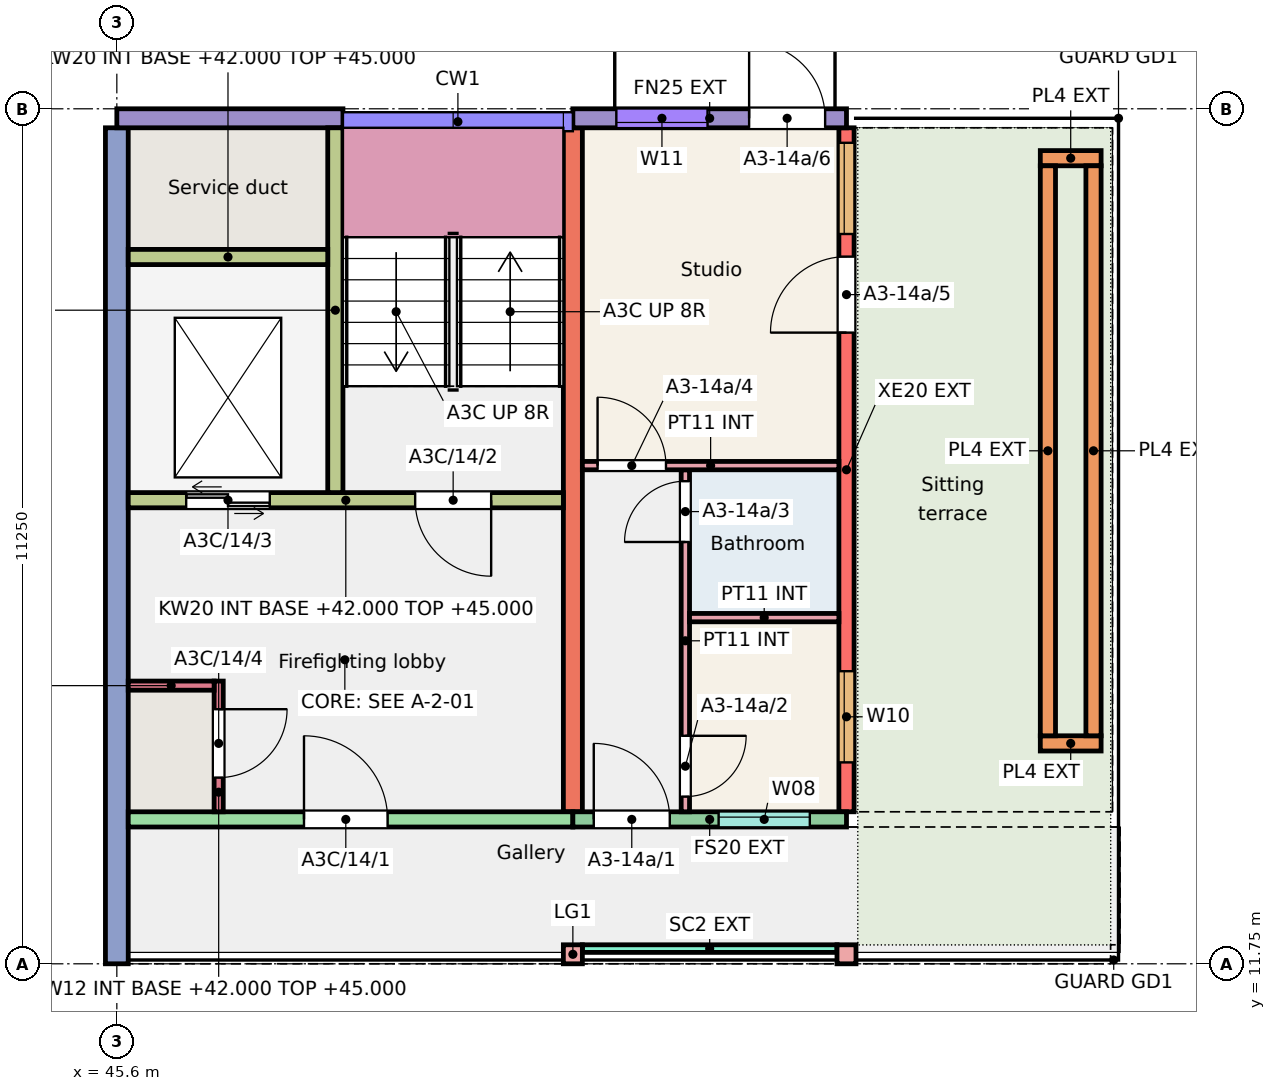
"""IFC4 building model, lengths in metres.
Left out: names, types, materials, properties, quantities, classifications, styles, units other than length and angle.
Written with IfcOpenShell. Run it as: python <this file> out.ifc"""

import sys

from ifc_helpers import new_model, si_unit, direction, frame, frame_2d, origin, origin_2d, place, context, subcontext, project, spatial, rectangle, extrude, element, fill, save


model = new_model("IFC4")
c1 = context("Model", 3, precision=1e-05, world=origin(), true_north=direction((0.0, 1.0)))
c2 = subcontext(c1, "Body", "Model", "MODEL_VIEW")
j1 = project(units=[si_unit("LENGTHUNIT", "METRE"), si_unit("PLANEANGLEUNIT", "RADIAN")], contexts=[c1])
p1 = place(None, origin())
s1 = spatial("IfcSite", under=j1, at=p1, CompositionType="ELEMENT")
p2 = place(p1, origin())
s2 = spatial("IfcBuilding", under=s1, at=p2, CompositionType="ELEMENT")
p3 = place(p2, frame((0.0, 0.0, 42.0)))
s3 = spatial("IfcBuildingStorey", under=s2, at=p3, CompositionType="ELEMENT", Elevation=42.0)
p4 = place(p3, frame((45.6, 11.75, 0.0), z_axis=(0.0, 0.0, 1.0), x_axis=(0.0, 1.0, 0.0)))
e1 = element("IfcWall", 1, at=p4, inside=s3, PredefinedType="SHEAR", context=c2, shape_type="SweptSolid", body=[
    extrude(rectangle(XDim=11.0, YDim=0.3, at=frame_2d((5.5, 0.0))), origin(), (0.0, 0.0, 1.0), 3.0),
])
p5 = place(p3, frame((51.6, 13.75, 0.0), z_axis=(0.0, 0.0, 1.0), x_axis=(0.0, 1.0, 0.0)))
e2 = element("IfcWall", 2, at=p5, inside=s3, PredefinedType="SHEAR", context=c2, shape_type="SweptSolid", body=[
    extrude(rectangle(XDim=9.0, YDim=0.25, at=frame_2d((4.5, 0.0))), origin(), (0.0, 0.0, 1.0), 3.0),
])
p6 = place(p3, frame((55.2, 13.75, 0.0), z_axis=(0.0, 0.0, 1.0), x_axis=(0.0, 1.0, 0.0)))
e3 = element("IfcWall", 3, at=p6, inside=s3, PredefinedType="SHEAR", context=c2, shape_type="SweptSolid", body=[
    extrude(rectangle(XDim=9.0, YDim=0.2, at=frame_2d((4.5, 0.0))), origin(), (0.0, 0.0, 1.0), 3.0),
])
p7 = place(p6, frame((0.65, 0.0, 0.9)))
e4 = element("IfcOpeningElement", 4, at=p7, cuts=e3, PredefinedType="OPENING", context=c2, shape_type="SweptSolid", body=[
    extrude(rectangle(XDim=1.2, YDim=1.5, at=frame_2d((0.6, 0.75))), frame((0.0, 0.11, 0.0), z_axis=(0.0, -1.0, 0.0), x_axis=(1.0, 0.0, 0.0)), (0.0, 0.0, 1.0), 0.22),
])
p8 = place(p6, frame((7.603, 0.0, 0.9)))
e5 = element("IfcOpeningElement", 5, at=p8, cuts=e3, PredefinedType="OPENING", context=c2, shape_type="SweptSolid", body=[
    extrude(rectangle(XDim=1.2, YDim=1.5, at=frame_2d((0.6, 0.75))), frame((0.0, 0.11, 0.0), z_axis=(0.0, -1.0, 0.0), x_axis=(1.0, 0.0, 0.0)), (0.0, 0.0, 1.0), 0.22),
])
p9 = place(p6, frame((6.305, 0.0, 0.0)))
e6 = element("IfcOpeningElement", 6, at=p9, cuts=e3, PredefinedType="OPENING", context=c2, shape_type="SweptSolid", body=[
    extrude(rectangle(XDim=1.0, YDim=2.1, at=frame_2d((0.5, 1.05))), frame((0.0, 0.11, 0.0), z_axis=(0.0, -1.0, 0.0), x_axis=(1.0, 0.0, 0.0)), (0.0, 0.0, 1.0), 0.22),
])
p10 = place(p3, frame((45.6, 22.875, 0.0), z_axis=(0.0, 0.0, 1.0), x_axis=(1.0, 0.0, 0.0)))
e7 = element("IfcWall", 7, at=p10, inside=s3, PredefinedType="SOLIDWALL", context=c2, shape_type="SweptSolid", body=[
    extrude(rectangle(XDim=2.975, YDim=0.25, at=frame_2d((1.487, 0.0))), origin(), (0.0, 0.0, 1.0), 3.0),
])
p11 = place(p3, frame((45.75, 13.65, 0.0), z_axis=(0.0, 0.0, 1.0), x_axis=(1.0, 0.0, 0.0)))
e8 = element("IfcWall", 8, at=p11, inside=s3, PredefinedType="SHEAR", context=c2, shape_type="SweptSolid", body=[
    extrude(rectangle(XDim=5.85, YDim=0.2, at=frame_2d((2.925, 0.0))), origin(), (0.0, 0.0, 1.0), 3.0),
])
p12 = place(p11, frame((2.312, 0.0, 0.0)))
e9 = element("IfcOpeningElement", 9, at=p12, cuts=e8, PredefinedType="OPENING", context=c2, shape_type="SweptSolid", body=[
    extrude(rectangle(XDim=1.1, YDim=2.1, at=frame_2d((0.55, 1.05))), frame((0.0, 0.11, 0.0), z_axis=(0.0, -1.0, 0.0), x_axis=(1.0, 0.0, 0.0)), (0.0, 0.0, 1.0), 0.22),
])
p13 = place(p3, frame((45.75, 17.85, 0.0), z_axis=(0.0, 0.0, 1.0), x_axis=(1.0, 0.0, 0.0)))
e10 = element("IfcWall", 10, at=p13, inside=s3, PredefinedType="SHEAR", context=c2, shape_type="SweptSolid", body=[
    extrude(rectangle(XDim=5.725, YDim=0.2, at=frame_2d((2.863, 0.0))), origin(), (0.0, 0.0, 1.0), 3.0),
])
p14 = place(p13, frame((3.775, 0.0, 0.0)))
e11 = element("IfcOpeningElement", 11, at=p14, cuts=e10, PredefinedType="OPENING", context=c2, shape_type="SweptSolid", body=[
    extrude(rectangle(XDim=1.0, YDim=2.1, at=frame_2d((0.5, 1.05))), frame((0.0, 0.11, 0.0), z_axis=(0.0, -1.0, 0.0), x_axis=(1.0, 0.0, 0.0)), (0.0, 0.0, 1.0), 0.22),
])
p15 = place(p13, frame((0.762, 0.0, 0.0)))
e12 = element("IfcOpeningElement", 12, at=p15, cuts=e10, PredefinedType="OPENING", context=c2, shape_type="SweptSolid", body=[
    extrude(rectangle(XDim=1.1, YDim=2.1, at=frame_2d((0.55, 1.05))), frame((0.0, 0.11, 0.0), z_axis=(0.0, -1.0, 0.0), x_axis=(1.0, 0.0, 0.0)), (0.0, 0.0, 1.0), 0.22),
])
p16 = place(p3, frame((48.475, 17.95, 0.0), z_axis=(0.0, 0.0, 1.0), x_axis=(0.0, 1.0, 0.0)))
e13 = element("IfcWall", 13, at=p16, inside=s3, PredefinedType="SHEAR", context=c2, shape_type="SweptSolid", body=[
    extrude(rectangle(XDim=4.8, YDim=0.2, at=frame_2d((2.4, 0.0))), origin(), (0.0, 0.0, 1.0), 3.0),
])
p17 = place(p3, frame((45.75, 21.05, 0.0), z_axis=(0.0, 0.0, 1.0), x_axis=(1.0, 0.0, 0.0)))
e14 = element("IfcWall", 14, at=p17, inside=s3, PredefinedType="SHEAR", context=c2, shape_type="SweptSolid", body=[
    extrude(rectangle(XDim=2.625, YDim=0.2, at=frame_2d((1.312, 0.0))), origin(), (0.0, 0.0, 1.0), 3.0),
])
p18 = place(p3, frame((46.94, 13.75, 0.0), z_axis=(0.0, 0.0, 1.0), x_axis=(0.0, 1.0, 0.0)))
e15 = element("IfcWall", 15, at=p18, inside=s3, PredefinedType="SHEAR", context=c2, shape_type="SweptSolid", body=[
    extrude(rectangle(XDim=1.72, YDim=0.12, at=frame_2d((0.86, 0.0))), origin(), (0.0, 0.0, 1.0), 3.0),
])
p19 = place(p18, frame((0.45, 0.0, 0.0)))
e16 = element("IfcOpeningElement", 16, at=p19, cuts=e15, PredefinedType="OPENING", context=c2, shape_type="SweptSolid", body=[
    extrude(rectangle(XDim=0.9, YDim=2.1, at=frame_2d((0.45, 1.05))), frame((0.0, 0.07, 0.0), z_axis=(0.0, -1.0, 0.0), x_axis=(1.0, 0.0, 0.0)), (0.0, 0.0, 1.0), 0.14),
])
p20 = place(p3, frame((45.75, 15.41, 0.0), z_axis=(0.0, 0.0, 1.0), x_axis=(1.0, 0.0, 0.0)))
e17 = element("IfcWall", 17, at=p20, inside=s3, PredefinedType="SHEAR", context=c2, shape_type="SweptSolid", body=[
    extrude(rectangle(XDim=1.13, YDim=0.12, at=frame_2d((0.565, 0.0))), origin(), (0.0, 0.0, 1.0), 3.0),
])
p21 = place(p3, frame((51.6, 22.875, 0.0), z_axis=(0.0, 0.0, 1.0), x_axis=(1.0, 0.0, 0.0)))
e18 = element("IfcWall", 18, at=p21, inside=s3, PredefinedType="SOLIDWALL", context=c2, shape_type="SweptSolid", body=[
    extrude(rectangle(XDim=3.6, YDim=0.25, at=frame_2d((1.8, 0.0))), origin(), (0.0, 0.0, 1.0), 3.0),
])
p22 = place(p21, frame((0.572, 0.0, 0.8)))
e19 = element("IfcOpeningElement", 19, at=p22, cuts=e18, PredefinedType="OPENING", context=c2, shape_type="SweptSolid", body=[
    extrude(rectangle(XDim=1.2, YDim=1.6, at=frame_2d((0.6, 0.8))), frame((0.0, 0.135, 0.0), z_axis=(0.0, -1.0, 0.0), x_axis=(1.0, 0.0, 0.0)), (0.0, 0.0, 1.0), 0.27),
])
p23 = place(p21, frame((2.319, 0.0, 0.0)))
e20 = element("IfcOpeningElement", 20, at=p23, cuts=e18, PredefinedType="OPENING", context=c2, shape_type="SweptSolid", body=[
    extrude(rectangle(XDim=1.0, YDim=2.1, at=frame_2d((0.5, 1.05))), frame((0.0, 0.135, 0.0), z_axis=(0.0, -1.0, 0.0), x_axis=(1.0, 0.0, 0.0)), (0.0, 0.0, 1.0), 0.27),
])
p24 = place(p3, frame((51.6, 13.65, 0.0), z_axis=(0.0, 0.0, 1.0), x_axis=(1.0, 0.0, 0.0)))
e21 = element("IfcWall", 21, at=p24, inside=s3, PredefinedType="SOLIDWALL", context=c2, shape_type="SweptSolid", body=[
    extrude(rectangle(XDim=3.6, YDim=0.2, at=frame_2d((1.8, 0.0))), origin(), (0.0, 0.0, 1.0), 3.0),
])
p25 = place(p24, frame((1.917, 0.0, 1.1)))
e22 = element("IfcOpeningElement", 22, at=p25, cuts=e21, PredefinedType="OPENING", context=c2, shape_type="SweptSolid", body=[
    extrude(rectangle(XDim=1.2, YDim=1.3, at=frame_2d((0.6, 0.65))), frame((0.0, 0.11, 0.0), z_axis=(0.0, -1.0, 0.0), x_axis=(1.0, 0.0, 0.0)), (0.0, 0.0, 1.0), 0.22),
])
p26 = place(p24, frame((0.275, 0.0, 0.0)))
e23 = element("IfcOpeningElement", 23, at=p26, cuts=e21, PredefinedType="OPENING", context=c2, shape_type="SweptSolid", body=[
    extrude(rectangle(XDim=1.0, YDim=2.1, at=frame_2d((0.5, 1.05))), frame((0.0, 0.11, 0.0), z_axis=(0.0, -1.0, 0.0), x_axis=(1.0, 0.0, 0.0)), (0.0, 0.0, 1.0), 0.22),
])
for number, where, z_axis, x_axis in (
    (24, (51.6, 11.875, 0.0), (0.0, 0.0, 1.0), (1.0, 0.0, 0.0)),
    (25, (55.2, 11.875, 0.0), (0.0, 0.0, 1.0), (1.0, 0.0, 0.0)),
):
    element("IfcColumn", number, at=place(p3, frame(where, z_axis=z_axis, x_axis=x_axis)), inside=s3, PredefinedType="COLUMN", context=c2, shape_type="SweptSolid", body=[
        extrude(rectangle(XDim=0.25, YDim=0.25, at=origin_2d()), origin(), (0.0, 0.0, 1.0), 3.0),
    ])
for number, where, z_axis, x_axis in (
    (26, (57.75, 14.65, 0.01), (0.0, 0.0, 1.0), (1.0, 0.0, 0.0)),
    (27, (57.75, 22.35, 0.01), (0.0, 0.0, 1.0), (1.0, 0.0, 0.0)),
):
    element("IfcWall", number, at=place(p3, frame(where, z_axis=z_axis, x_axis=x_axis)), inside=s3, PredefinedType="SOLIDWALL", context=c2, shape_type="SweptSolid", body=[
        extrude(rectangle(XDim=0.8, YDim=0.2, at=frame_2d((0.4, 0.0))), origin(), (0.0, 0.0, 1.0), 0.45),
    ])
for number, where, z_axis, x_axis in (
    (28, (57.85, 14.75, 0.01), (0.0, 0.0, 1.0), (0.0, 1.0, 0.0)),
    (29, (58.45, 14.75, 0.01), (0.0, 0.0, 1.0), (0.0, 1.0, 0.0)),
):
    element("IfcWall", number, at=place(p3, frame(where, z_axis=z_axis, x_axis=x_axis)), inside=s3, PredefinedType="SOLIDWALL", context=c2, shape_type="SweptSolid", body=[
        extrude(rectangle(XDim=7.5, YDim=0.2, at=frame_2d((3.75, 0.0))), origin(), (0.0, 0.0, 1.0), 0.45),
    ])
p27 = place(p3, frame((51.725, 11.95, 0.0), z_axis=(0.0, 0.0, 1.0), x_axis=(1.0, 0.0, 0.0)))
e30 = element("IfcWall", 30, at=p27, inside=s3, PredefinedType="SOLIDWALL", context=c2, shape_type="SweptSolid", body=[
    extrude(rectangle(XDim=3.35, YDim=0.1, at=frame_2d((1.675, 0.0))), origin(), (0.0, 0.0, 1.0), 2.45),
])
p28 = place(p3, frame((53.08, 13.75, 0.0), z_axis=(0.0, 0.0, 1.0), x_axis=(0.0, 1.0, 0.0)))
e31 = element("IfcWall", 31, at=p28, inside=s3, PredefinedType="PARTITIONING", context=c2, shape_type="SweptSolid", body=[
    extrude(rectangle(XDim=4.5, YDim=0.11, at=frame_2d((2.25, 0.0))), origin(), (0.0, 0.0, 1.0), 2.75),
])
p29 = place(p28, frame((0.2, 0.0, 0.0)))
e32 = element("IfcOpeningElement", 32, at=p29, cuts=e31, PredefinedType="OPENING", context=c2, shape_type="SweptSolid", body=[
    extrude(rectangle(XDim=0.8, YDim=2.1, at=frame_2d((0.4, 1.05))), frame((0.0, 0.065, 0.0), z_axis=(0.0, -1.0, 0.0), x_axis=(1.0, 0.0, 0.0)), (0.0, 0.0, 1.0), 0.13),
])
p30 = place(p28, frame((3.55, 0.0, 0.0)))
e33 = element("IfcOpeningElement", 33, at=p30, cuts=e31, PredefinedType="OPENING", context=c2, shape_type="SweptSolid", body=[
    extrude(rectangle(XDim=0.8, YDim=2.1, at=frame_2d((0.4, 1.05))), frame((0.0, 0.065, 0.0), z_axis=(0.0, -1.0, 0.0), x_axis=(1.0, 0.0, 0.0)), (0.0, 0.0, 1.0), 0.13),
])
p31 = place(p3, frame((53.135, 16.305, 0.0), z_axis=(0.0, 0.0, 1.0), x_axis=(1.0, 0.0, 0.0)))
e34 = element("IfcWall", 34, at=p31, inside=s3, PredefinedType="PARTITIONING", context=c2, shape_type="SweptSolid", body=[
    extrude(rectangle(XDim=1.965, YDim=0.11, at=frame_2d((0.982, 0.0))), origin(), (0.0, 0.0, 1.0), 2.75),
])
p32 = place(p3, frame((51.725, 18.305, 0.0), z_axis=(0.0, 0.0, 1.0), x_axis=(1.0, 0.0, 0.0)))
e35 = element("IfcWall", 35, at=p32, inside=s3, PredefinedType="PARTITIONING", context=c2, shape_type="SweptSolid", body=[
    extrude(rectangle(XDim=3.375, YDim=0.11, at=frame_2d((1.688, 0.0))), origin(), (0.0, 0.0, 1.0), 2.75),
])
p33 = place(p32, frame((0.2, 0.0, 0.0)))
e36 = element("IfcOpeningElement", 36, at=p33, cuts=e35, PredefinedType="OPENING", context=c2, shape_type="SweptSolid", body=[
    extrude(rectangle(XDim=0.9, YDim=2.1, at=frame_2d((0.45, 1.05))), frame((0.0, 0.065, 0.0), z_axis=(0.0, -1.0, 0.0), x_axis=(1.0, 0.0, 0.0)), (0.0, 0.0, 1.0), 0.13),
])
p34 = place(p25, origin())
e37 = element("IfcWindow", 37, at=p34, inside=s3, PartitioningType="SINGLE_PANEL", PredefinedType="WINDOW", context=c2, shape_type="SweptSolid", body=[
    extrude(rectangle(XDim=1.2, YDim=1.3, at=frame_2d((0.6, 0.65))), frame((0.0, 0.06, 0.0), z_axis=(0.0, -1.0, 0.0), x_axis=(1.0, 0.0, 0.0)), (0.0, 0.0, 1.0), 0.06),
])
fill(e22, e37)
p35 = place(p22, origin())
e38 = element("IfcWindow", 38, at=p35, inside=s3, PartitioningType="SINGLE_PANEL", PredefinedType="WINDOW", context=c2, shape_type="SweptSolid", body=[
    extrude(rectangle(XDim=1.2, YDim=1.6, at=frame_2d((0.6, 0.8))), frame((0.0, -0.025, 0.0), z_axis=(0.0, -1.0, 0.0), x_axis=(1.0, 0.0, 0.0)), (0.0, 0.0, 1.0), 0.06),
])
fill(e19, e38)
p36 = place(p7, origin())
e39 = element("IfcWindow", 39, at=p36, inside=s3, PartitioningType="SINGLE_PANEL", PredefinedType="WINDOW", context=c2, shape_type="SweptSolid", body=[
    extrude(rectangle(XDim=1.2, YDim=1.5, at=frame_2d((0.6, 0.75))), frame((0.0, 0.06, 0.0), z_axis=(0.0, -1.0, 0.0), x_axis=(1.0, 0.0, 0.0)), (0.0, 0.0, 1.0), 0.06),
])
fill(e4, e39)
p37 = place(p8, origin())
e40 = element("IfcWindow", 40, at=p37, inside=s3, PartitioningType="SINGLE_PANEL", PredefinedType="WINDOW", context=c2, shape_type="SweptSolid", body=[
    extrude(rectangle(XDim=1.2, YDim=1.5, at=frame_2d((0.6, 0.75))), frame((0.0, 0.06, 0.0), z_axis=(0.0, -1.0, 0.0), x_axis=(1.0, 0.0, 0.0)), (0.0, 0.0, 1.0), 0.06),
])
fill(e5, e40)
p38 = place(p26, origin())
e41 = element("IfcDoor", 41, at=p38, inside=s3, OperationType="SINGLE_SWING_LEFT", PredefinedType="DOOR", context=c2, shape_type="SweptSolid", body=[
    extrude(rectangle(XDim=1.0, YDim=2.1, at=frame_2d((0.5, 1.05))), frame((0.0, 0.025, 0.0), z_axis=(0.0, -1.0, 0.0), x_axis=(1.0, 0.0, 0.0)), (0.0, 0.0, 1.0), 0.05),
])
fill(e23, e41)
p39 = place(p29, origin())
e42 = element("IfcDoor", 42, at=p39, inside=s3, OperationType="SINGLE_SWING_RIGHT", PredefinedType="DOOR", context=c2, shape_type="SweptSolid", body=[
    extrude(rectangle(XDim=0.8, YDim=2.1, at=frame_2d((0.4, 1.05))), frame((0.0, 0.025, 0.0), z_axis=(0.0, -1.0, 0.0), x_axis=(1.0, 0.0, 0.0)), (0.0, 0.0, 1.0), 0.05),
])
fill(e32, e42)
p40 = place(p30, origin())
e43 = element("IfcDoor", 43, at=p40, inside=s3, OperationType="SINGLE_SWING_LEFT", PredefinedType="DOOR", context=c2, shape_type="SweptSolid", body=[
    extrude(rectangle(XDim=0.8, YDim=2.1, at=frame_2d((0.4, 1.05))), frame((0.0, 0.025, 0.0), z_axis=(0.0, -1.0, 0.0), x_axis=(1.0, 0.0, 0.0)), (0.0, 0.0, 1.0), 0.05),
])
fill(e33, e43)
p41 = place(p33, origin())
e44 = element("IfcDoor", 44, at=p41, inside=s3, OperationType="SINGLE_SWING_LEFT", PredefinedType="DOOR", context=c2, shape_type="SweptSolid", body=[
    extrude(rectangle(XDim=0.9, YDim=2.1, at=frame_2d((0.45, 1.05))), frame((0.0, 0.025, 0.0), z_axis=(0.0, -1.0, 0.0), x_axis=(1.0, 0.0, 0.0)), (0.0, 0.0, 1.0), 0.05),
])
fill(e36, e44)
p42 = place(p9, origin())
e45 = element("IfcDoor", 45, at=p42, inside=s3, OperationType="SINGLE_SWING_LEFT", PredefinedType="DOOR", context=c2, shape_type="SweptSolid", body=[
    extrude(rectangle(XDim=1.0, YDim=2.1, at=frame_2d((0.5, 1.05))), frame((0.0, 0.025, 0.0), z_axis=(0.0, -1.0, 0.0), x_axis=(1.0, 0.0, 0.0)), (0.0, 0.0, 1.0), 0.05),
])
fill(e6, e45)
p43 = place(p23, origin())
e46 = element("IfcDoor", 46, at=p43, inside=s3, OperationType="SINGLE_SWING_LEFT", PredefinedType="DOOR", context=c2, shape_type="SweptSolid", body=[
    extrude(rectangle(XDim=1.0, YDim=2.1, at=frame_2d((0.5, 1.05))), frame((0.0, 0.025, 0.0), z_axis=(0.0, -1.0, 0.0), x_axis=(1.0, 0.0, 0.0)), (0.0, 0.0, 1.0), 0.05),
])
fill(e20, e46)
p44 = place(p12, origin())
e47 = element("IfcDoor", 47, at=p44, inside=s3, OperationType="SINGLE_SWING_LEFT", PredefinedType="DOOR", context=c2, shape_type="SweptSolid", body=[
    extrude(rectangle(XDim=1.1, YDim=2.1, at=frame_2d((0.55, 1.05))), frame((0.0, 0.025, 0.0), z_axis=(0.0, -1.0, 0.0), x_axis=(1.0, 0.0, 0.0)), (0.0, 0.0, 1.0), 0.05),
])
fill(e9, e47)
p45 = place(p14, origin())
e48 = element("IfcDoor", 48, at=p45, inside=s3, OperationType="SINGLE_SWING_RIGHT", PredefinedType="DOOR", context=c2, shape_type="SweptSolid", body=[
    extrude(rectangle(XDim=1.0, YDim=2.1, at=frame_2d((0.5, 1.05))), frame((0.0, 0.025, 0.0), z_axis=(0.0, -1.0, 0.0), x_axis=(1.0, 0.0, 0.0)), (0.0, 0.0, 1.0), 0.05),
])
fill(e11, e48)
p46 = place(p15, origin())
e49 = element("IfcDoor", 49, at=p46, inside=s3, OperationType="DOUBLE_DOOR_SLIDING", PredefinedType="DOOR", context=c2, shape_type="SweptSolid", body=[
    extrude(rectangle(XDim=1.1, YDim=2.1, at=frame_2d((0.55, 1.05))), frame((0.0, 0.025, 0.0), z_axis=(0.0, -1.0, 0.0), x_axis=(1.0, 0.0, 0.0)), (0.0, 0.0, 1.0), 0.05),
])
fill(e12, e49)
p47 = place(p19, origin())
e50 = element("IfcDoor", 50, at=p47, inside=s3, OperationType="SINGLE_SWING_RIGHT", PredefinedType="DOOR", context=c2, shape_type="SweptSolid", body=[
    extrude(rectangle(XDim=0.9, YDim=2.1, at=frame_2d((0.45, 1.05))), frame((0.0, 0.025, 0.0), z_axis=(0.0, -1.0, 0.0), x_axis=(1.0, 0.0, 0.0)), (0.0, 0.0, 1.0), 0.05),
])
fill(e16, e50)
save(model, sys.argv[1])
